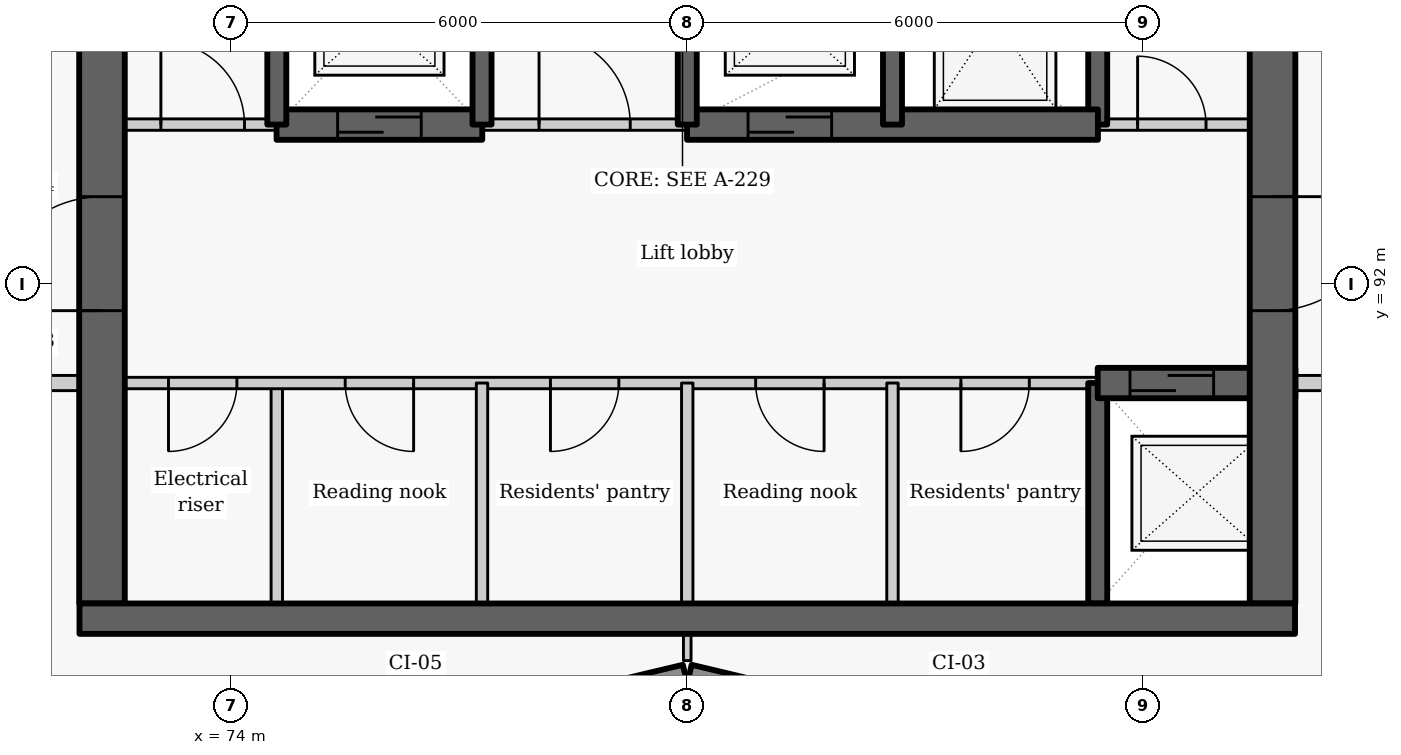
"""IFC4 building model, lengths in metres.
Left out: names, types, materials, properties, quantities, classifications, styles, units other than length and angle.
Written with IfcOpenShell. Run it as: python <this file> out.ifc"""

import sys

from ifc_helpers import new_model, si_unit, direction, frame, frame_2d, origin, place, context, subcontext, project, spatial, rectangle, extrude, element, fill, save


model = new_model("IFC4")
c1 = context("Model", 3, precision=1e-05, world=origin(), true_north=direction((0.0, 1.0)))
c2 = subcontext(c1, "Body", "Model", "MODEL_VIEW")
j1 = project(units=[si_unit("LENGTHUNIT", "METRE"), si_unit("PLANEANGLEUNIT", "RADIAN")], contexts=[c1])
p1 = place(None, origin())
s1 = spatial("IfcSite", under=j1, at=p1, CompositionType="ELEMENT")
p2 = place(p1, origin())
s2 = spatial("IfcBuilding", under=s1, at=p2, CompositionType="ELEMENT")
p3 = place(p2, frame((0.0, 0.0, 166.8)))
s3 = spatial("IfcBuildingStorey", under=s2, at=p3, CompositionType="ELEMENT", Elevation=166.8)
p4 = place(p3, frame((76.814, 86.119, 0.0), z_axis=(0.0, 0.0, 1.0), x_axis=(0.972773113459, 0.231759508395, 0.0)))
e1 = element("IfcWall", 1, at=p4, inside=s3, PredefinedType="SOLIDWALL", context=c2, shape_type="SweptSolid", body=[
    extrude(rectangle(XDim=3.246, YDim=0.25, at=frame_2d((1.623, 0.0))), origin(), (0.0, 0.0, 1.0), 2.05),
])
p5 = place(p4, frame((0.573, 0.0, 0.9)))
e2 = element("IfcOpeningElement", 2, at=p5, cuts=e1, PredefinedType="OPENING", context=c2, shape_type="SweptSolid", body=[
    extrude(rectangle(XDim=2.1, YDim=1.1, at=frame_2d((1.05, 0.55))), frame((0.0, 0.135, 0.0), z_axis=(0.0, -1.0, 0.0), x_axis=(1.0, 0.0, 0.0)), (0.0, 0.0, 1.0), 0.27),
])
p6 = place(p3, frame((80.029, 86.872, 0.0), z_axis=(0.0, 0.0, 1.0), x_axis=(0.972773113459, -0.231759508395, 0.0)))
e3 = element("IfcWall", 3, at=p6, inside=s3, PredefinedType="SOLIDWALL", context=c2, shape_type="SweptSolid", body=[
    extrude(rectangle(XDim=3.246, YDim=0.25, at=frame_2d((1.623, 0.0))), origin(), (0.0, 0.0, 1.0), 2.05),
])
p7 = place(p6, frame((0.573, 0.0, 0.9)))
e4 = element("IfcOpeningElement", 4, at=p7, cuts=e3, PredefinedType="OPENING", context=c2, shape_type="SweptSolid", body=[
    extrude(rectangle(XDim=2.1, YDim=1.1, at=frame_2d((1.05, 0.55))), frame((0.0, 0.135, 0.0), z_axis=(0.0, -1.0, 0.0), x_axis=(1.0, 0.0, 0.0)), (0.0, 0.0, 1.0), 0.27),
])
p8 = place(p3, frame((74.6, 87.8, 0.0), z_axis=(0.0, 0.0, 1.0), x_axis=(0.0, 1.0, 0.0)))
e5 = element("IfcWall", 5, at=p8, inside=s3, PredefinedType="PARTITIONING", context=c2, shape_type="SweptSolid", body=[
    extrude(rectangle(XDim=2.9, YDim=0.15, at=frame_2d((1.45, 0.0))), origin(), (0.0, 0.0, 1.0), 2.95),
])
p9 = place(p3, frame((85.4, 90.7, 0.0), z_axis=(0.0, 0.0, 1.0), x_axis=(-1.0, 0.0, 0.0)))
e6 = element("IfcWall", 6, at=p9, inside=s3, PredefinedType="PARTITIONING", context=c2, shape_type="SweptSolid", body=[
    extrude(rectangle(XDim=13.4, YDim=0.15, at=frame_2d((6.7, 0.0))), origin(), (0.0, 0.0, 1.0), 2.95),
])
p10 = place(p9, frame((11.325, 0.0, 0.0)))
e7 = element("IfcOpeningElement", 7, at=p10, cuts=e6, PredefinedType="OPENING", context=c2, shape_type="SweptSolid", body=[
    extrude(rectangle(XDim=0.9, YDim=2.1, at=frame_2d((0.45, 1.05))), frame((0.0, 0.085, 0.0), z_axis=(0.0, -1.0, 0.0), x_axis=(1.0, 0.0, 0.0)), (0.0, 0.0, 1.0), 0.17),
])
p11 = place(p9, frame((9.0, 0.0, 0.0)))
e8 = element("IfcOpeningElement", 8, at=p11, cuts=e6, PredefinedType="OPENING", context=c2, shape_type="SweptSolid", body=[
    extrude(rectangle(XDim=0.9, YDim=2.1, at=frame_2d((0.45, 1.05))), frame((0.0, 0.085, 0.0), z_axis=(0.0, -1.0, 0.0), x_axis=(1.0, 0.0, 0.0)), (0.0, 0.0, 1.0), 0.17),
])
p12 = place(p9, frame((6.3, 0.0, 0.0)))
e9 = element("IfcOpeningElement", 9, at=p12, cuts=e6, PredefinedType="OPENING", context=c2, shape_type="SweptSolid", body=[
    extrude(rectangle(XDim=0.9, YDim=2.1, at=frame_2d((0.45, 1.05))), frame((0.0, 0.085, 0.0), z_axis=(0.0, -1.0, 0.0), x_axis=(1.0, 0.0, 0.0)), (0.0, 0.0, 1.0), 0.17),
])
p13 = place(p9, frame((3.6, 0.0, 0.0)))
e10 = element("IfcOpeningElement", 10, at=p13, cuts=e6, PredefinedType="OPENING", context=c2, shape_type="SweptSolid", body=[
    extrude(rectangle(XDim=0.9, YDim=2.1, at=frame_2d((0.45, 1.05))), frame((0.0, 0.085, 0.0), z_axis=(0.0, -1.0, 0.0), x_axis=(1.0, 0.0, 0.0)), (0.0, 0.0, 1.0), 0.17),
])
p14 = place(p9, frame((0.9, 0.0, 0.0)))
e11 = element("IfcOpeningElement", 11, at=p14, cuts=e6, PredefinedType="OPENING", context=c2, shape_type="SweptSolid", body=[
    extrude(rectangle(XDim=0.9, YDim=2.1, at=frame_2d((0.45, 1.05))), frame((0.0, 0.085, 0.0), z_axis=(0.0, -1.0, 0.0), x_axis=(1.0, 0.0, 0.0)), (0.0, 0.0, 1.0), 0.17),
])
p15 = place(p3, frame((72.3, 87.8, -0.275), z_axis=(0.0, 0.0, 1.0), x_axis=(0.0, 1.0, 0.0)))
e12 = element("IfcWall", 12, at=p15, inside=s3, PredefinedType="SHEAR", context=c2, shape_type="SweptSolid", body=[
    extrude(rectangle(XDim=9.1, YDim=0.6, at=frame_2d((4.55, 0.0))), origin(), (0.0, 0.0, 1.0), 3.225),
])
p16 = place(p15, frame((3.852, 0.0, 0.275)))
e13 = element("IfcOpeningElement", 13, at=p16, cuts=e12, PredefinedType="OPENING", context=c2, shape_type="SweptSolid", body=[
    extrude(rectangle(XDim=1.5, YDim=2.1, at=frame_2d((0.75, 1.05))), frame((0.0, 0.31, 0.0), z_axis=(0.0, -1.0, 0.0), x_axis=(1.0, 0.0, 0.0)), (0.0, 0.0, 1.0), 0.62),
])
p17 = place(p3, frame((85.4, 87.8, -0.275), z_axis=(0.0, 0.0, 1.0), x_axis=(0.0, 1.0, 0.0)))
e14 = element("IfcWall", 14, at=p17, inside=s3, PredefinedType="SHEAR", context=c2, shape_type="SweptSolid", body=[
    extrude(rectangle(XDim=2.9, YDim=0.25, at=frame_2d((1.45, 0.0))), origin(), (0.0, 0.0, 1.0), 3.225),
])
p18 = place(p3, frame((85.4, 94.1, -0.275), z_axis=(0.0, 0.0, 1.0), x_axis=(0.0, 1.0, 0.0)))
e15 = element("IfcWall", 15, at=p18, inside=s3, PredefinedType="SHEAR", context=c2, shape_type="SweptSolid", body=[
    extrude(rectangle(XDim=2.8, YDim=0.25, at=frame_2d((1.4, 0.0))), origin(), (0.0, 0.0, 1.0), 3.225),
])
p19 = place(p3, frame((85.4, 90.7, -0.275), z_axis=(0.0, 0.0, 1.0), x_axis=(1.0, 0.0, 0.0)))
e16 = element("IfcWall", 16, at=p19, inside=s3, PredefinedType="SHEAR", context=c2, shape_type="SweptSolid", body=[
    extrude(rectangle(XDim=2.6, YDim=0.4, at=frame_2d((1.3, 0.0))), origin(), (0.0, 0.0, 1.0), 3.225),
])
p20 = place(p19, frame((0.425, 0.0, 0.275)))
e17 = element("IfcOpeningElement", 17, at=p20, cuts=e16, PredefinedType="OPENING", context=c2, shape_type="SweptSolid", body=[
    extrude(rectangle(XDim=1.1, YDim=2.1, at=frame_2d((0.55, 1.05))), frame((0.0, 0.21, 0.0), z_axis=(0.0, -1.0, 0.0), x_axis=(1.0, 0.0, 0.0)), (0.0, 0.0, 1.0), 0.42),
])
p21 = place(p3, frame((87.7, 103.4, -0.275), z_axis=(0.0, 0.0, 1.0), x_axis=(0.0, -1.0, 0.0)))
e18 = element("IfcWall", 18, at=p21, inside=s3, PredefinedType="SHEAR", context=c2, shape_type="SweptSolid", body=[
    extrude(rectangle(XDim=15.6, YDim=0.6, at=frame_2d((7.8, 0.0))), origin(), (0.0, 0.0, 1.0), 3.225),
])
p22 = place(p21, frame((10.248, 0.0, 0.275)))
e19 = element("IfcOpeningElement", 19, at=p22, cuts=e18, PredefinedType="OPENING", context=c2, shape_type="SweptSolid", body=[
    extrude(rectangle(XDim=1.5, YDim=2.1, at=frame_2d((0.75, 1.05))), frame((0.0, 0.31, 0.0), z_axis=(0.0, -1.0, 0.0), x_axis=(1.0, 0.0, 0.0)), (0.0, 0.0, 1.0), 0.62),
])
for number, where, z_axis, x_axis in (
    (20, (77.3, 87.8, 0.0), (0.0, 0.0, 1.0), (0.0, 1.0, 0.0)),
    (21, (80.0, 87.8, 0.0), (0.0, 0.0, 1.0), (0.0, 1.0, 0.0)),
    (22, (82.7, 87.8, 0.0), (0.0, 0.0, 1.0), (0.0, 1.0, 0.0)),
):
    element("IfcWall", number, at=place(p3, frame(where, z_axis=z_axis, x_axis=x_axis)), inside=s3, PredefinedType="PARTITIONING", context=c2, shape_type="SweptSolid", body=[
        extrude(rectangle(XDim=2.9, YDim=0.15, at=frame_2d((1.45, 0.0))), origin(), (0.0, 0.0, 1.0), 2.95),
    ])
p23 = place(p3, frame((72.0, 94.1, 0.0), z_axis=(0.0, 0.0, 1.0), x_axis=(1.0, 0.0, 0.0)))
e23 = element("IfcWall", 23, at=p23, inside=s3, PredefinedType="PARTITIONING", context=c2, shape_type="SweptSolid", body=[
    extrude(rectangle(XDim=2.603, YDim=0.15, at=frame_2d((1.302, 0.0))), origin(), (0.0, 0.0, 1.0), 2.95),
])
p24 = place(p23, frame((1.075, 0.0, 0.0)))
e24 = element("IfcOpeningElement", 24, at=p24, cuts=e23, PredefinedType="OPENING", context=c2, shape_type="SweptSolid", body=[
    extrude(rectangle(XDim=1.1, YDim=2.1, at=frame_2d((0.55, 1.05))), frame((0.0, 0.085, 0.0), z_axis=(0.0, -1.0, 0.0), x_axis=(1.0, 0.0, 0.0)), (0.0, 0.0, 1.0), 0.17),
])
p25 = place(p3, frame((77.297, 94.1, 0.0), z_axis=(0.0, 0.0, 1.0), x_axis=(1.0, 0.0, 0.0)))
e25 = element("IfcWall", 25, at=p25, inside=s3, PredefinedType="PARTITIONING", context=c2, shape_type="SweptSolid", body=[
    extrude(rectangle(XDim=2.706, YDim=0.15, at=frame_2d((1.353, 0.0))), origin(), (0.0, 0.0, 1.0), 2.95),
])
p26 = place(p25, frame((0.753, 0.0, 0.0)))
e26 = element("IfcOpeningElement", 26, at=p26, cuts=e25, PredefinedType="OPENING", context=c2, shape_type="SweptSolid", body=[
    extrude(rectangle(XDim=1.2, YDim=2.1, at=frame_2d((0.6, 1.05))), frame((0.0, 0.085, 0.0), z_axis=(0.0, -1.0, 0.0), x_axis=(1.0, 0.0, 0.0)), (0.0, 0.0, 1.0), 0.17),
])
p27 = place(p3, frame((85.397, 94.1, 0.0), z_axis=(0.0, 0.0, 1.0), x_axis=(1.0, 0.0, 0.0)))
e27 = element("IfcWall", 27, at=p27, inside=s3, PredefinedType="PARTITIONING", context=c2, shape_type="SweptSolid", body=[
    extrude(rectangle(XDim=2.603, YDim=0.15, at=frame_2d((1.302, 0.0))), origin(), (0.0, 0.0, 1.0), 2.95),
])
p28 = place(p27, frame((0.528, 0.0, 0.0)))
e28 = element("IfcOpeningElement", 28, at=p28, cuts=e27, PredefinedType="OPENING", context=c2, shape_type="SweptSolid", body=[
    extrude(rectangle(XDim=0.9, YDim=2.1, at=frame_2d((0.45, 1.05))), frame((0.0, 0.085, 0.0), z_axis=(0.0, -1.0, 0.0), x_axis=(1.0, 0.0, 0.0)), (0.0, 0.0, 1.0), 0.17),
])
p29 = place(p3, frame((74.597, 94.1, -0.275), z_axis=(0.0, 0.0, 1.0), x_axis=(1.0, 0.0, 0.0)))
e29 = element("IfcWall", 29, at=p29, inside=s3, PredefinedType="SHEAR", context=c2, shape_type="SweptSolid", body=[
    extrude(rectangle(XDim=2.706, YDim=0.4, at=frame_2d((1.353, 0.0))), origin(), (0.0, 0.0, 1.0), 3.225),
])
p30 = place(p29, frame((0.803, 0.0, 0.275)))
e30 = element("IfcOpeningElement", 30, at=p30, cuts=e29, PredefinedType="OPENING", context=c2, shape_type="SweptSolid", body=[
    extrude(rectangle(XDim=1.1, YDim=2.1, at=frame_2d((0.55, 1.05))), frame((0.0, 0.21, 0.0), z_axis=(0.0, -1.0, 0.0), x_axis=(1.0, 0.0, 0.0)), (0.0, 0.0, 1.0), 0.42),
])
p31 = place(p3, frame((79.997, 94.1, -0.275), z_axis=(0.0, 0.0, 1.0), x_axis=(1.0, 0.0, 0.0)))
e31 = element("IfcWall", 31, at=p31, inside=s3, PredefinedType="SHEAR", context=c2, shape_type="SweptSolid", body=[
    extrude(rectangle(XDim=5.406, YDim=0.4, at=frame_2d((2.703, 0.0))), origin(), (0.0, 0.0, 1.0), 3.225),
])
p32 = place(p31, frame((0.803, 0.0, 0.275)))
e32 = element("IfcOpeningElement", 32, at=p32, cuts=e31, PredefinedType="OPENING", context=c2, shape_type="SweptSolid", body=[
    extrude(rectangle(XDim=1.1, YDim=2.1, at=frame_2d((0.55, 1.05))), frame((0.0, 0.21, 0.0), z_axis=(0.0, -1.0, 0.0), x_axis=(1.0, 0.0, 0.0)), (0.0, 0.0, 1.0), 0.42),
])
for number, where, z_axis, x_axis in (
    (33, (74.6, 94.1, -0.275), (0.0, 0.0, 1.0), (0.0, 1.0, 0.0)),
    (34, (77.3, 94.1, -0.275), (0.0, 0.0, 1.0), (0.0, 1.0, 0.0)),
    (35, (80.0, 94.1, -0.275), (0.0, 0.0, 1.0), (0.0, 1.0, 0.0)),
    (36, (82.7, 94.1, -0.275), (0.0, 0.0, 1.0), (0.0, 1.0, 0.0)),
):
    element("IfcWall", number, at=place(p3, frame(where, z_axis=z_axis, x_axis=x_axis)), inside=s3, PredefinedType="SHEAR", context=c2, shape_type="SweptSolid", body=[
        extrude(rectangle(XDim=2.8, YDim=0.25, at=frame_2d((1.4, 0.0))), origin(), (0.0, 0.0, 1.0), 3.225),
    ])
for number, where, z_axis, x_axis in (
    (37, (70.45, 90.7, 0.0), (0.0, 0.0, 1.0), (1.0, 0.0, 0.0)),
    (38, (88.0, 90.7, 0.0), (0.0, 0.0, 1.0), (1.0, 0.0, 0.0)),
):
    element("IfcWall", number, at=place(p3, frame(where, z_axis=z_axis, x_axis=x_axis)), inside=s3, PredefinedType="PARTITIONING", context=c2, shape_type="SweptSolid", body=[
        extrude(rectangle(XDim=1.55, YDim=0.2, at=frame_2d((0.775, 0.0))), origin(), (0.0, 0.0, 1.0), 2.95),
    ])
p33 = place(p3, frame((80.0, 87.048, 0.0), z_axis=(0.0, 0.0, 1.0), x_axis=(0.0, 1.0, 0.0)))
e39 = element("IfcWall", 39, at=p33, inside=s3, PredefinedType="PARTITIONING", context=c2, shape_type="SweptSolid", body=[
    extrude(rectangle(XDim=0.352, YDim=0.1, at=frame_2d((0.176, 0.0))), origin(), (0.0, 0.0, 1.0), 2.95),
])
p34 = place(p3, frame((72.004, 87.6, -0.275), z_axis=(0.0, 0.0, 1.0), x_axis=(1.0, 0.0, 0.0)))
e40 = element("IfcWall", 40, at=p34, inside=s3, PredefinedType="SHEAR", context=c2, shape_type="SweptSolid", body=[
    extrude(rectangle(XDim=15.992, YDim=0.4, at=frame_2d((7.996, 0.0))), origin(), (0.0, 0.0, 1.0), 3.225),
])
p35 = place(p10, origin())
e41 = element("IfcDoor", 41, at=p35, inside=s3, OperationType="SINGLE_SWING_RIGHT", PredefinedType="DOOR", context=c2, shape_type="SweptSolid", body=[
    extrude(rectangle(XDim=0.9, YDim=2.1, at=frame_2d((0.45, 1.05))), frame((0.0, 0.025, 0.0), z_axis=(0.0, -1.0, 0.0), x_axis=(1.0, 0.0, 0.0)), (0.0, 0.0, 1.0), 0.05),
])
fill(e7, e41)
p36 = place(p20, origin())
e42 = element("IfcDoor", 42, at=p36, inside=s3, OperationType="SLIDING_TO_LEFT", PredefinedType="DOOR", context=c2, shape_type="SweptSolid", body=[
    extrude(rectangle(XDim=1.1, YDim=2.1, at=frame_2d((0.55, 1.05))), frame((0.0, 0.025, 0.0), z_axis=(0.0, -1.0, 0.0), x_axis=(1.0, 0.0, 0.0)), (0.0, 0.0, 1.0), 0.05),
])
fill(e17, e42)
p37 = place(p11, origin())
e43 = element("IfcDoor", 43, at=p37, inside=s3, OperationType="SINGLE_SWING_LEFT", PredefinedType="DOOR", context=c2, shape_type="SweptSolid", body=[
    extrude(rectangle(XDim=0.9, YDim=2.1, at=frame_2d((0.45, 1.05))), frame((0.0, 0.025, 0.0), z_axis=(0.0, -1.0, 0.0), x_axis=(1.0, 0.0, 0.0)), (0.0, 0.0, 1.0), 0.05),
])
fill(e8, e43)
p38 = place(p12, origin())
e44 = element("IfcDoor", 44, at=p38, inside=s3, OperationType="SINGLE_SWING_RIGHT", PredefinedType="DOOR", context=c2, shape_type="SweptSolid", body=[
    extrude(rectangle(XDim=0.9, YDim=2.1, at=frame_2d((0.45, 1.05))), frame((0.0, 0.025, 0.0), z_axis=(0.0, -1.0, 0.0), x_axis=(1.0, 0.0, 0.0)), (0.0, 0.0, 1.0), 0.05),
])
fill(e9, e44)
p39 = place(p13, origin())
e45 = element("IfcDoor", 45, at=p39, inside=s3, OperationType="SINGLE_SWING_LEFT", PredefinedType="DOOR", context=c2, shape_type="SweptSolid", body=[
    extrude(rectangle(XDim=0.9, YDim=2.1, at=frame_2d((0.45, 1.05))), frame((0.0, 0.025, 0.0), z_axis=(0.0, -1.0, 0.0), x_axis=(1.0, 0.0, 0.0)), (0.0, 0.0, 1.0), 0.05),
])
fill(e10, e45)
p40 = place(p14, origin())
e46 = element("IfcDoor", 46, at=p40, inside=s3, OperationType="SINGLE_SWING_RIGHT", PredefinedType="DOOR", context=c2, shape_type="SweptSolid", body=[
    extrude(rectangle(XDim=0.9, YDim=2.1, at=frame_2d((0.45, 1.05))), frame((0.0, 0.025, 0.0), z_axis=(0.0, -1.0, 0.0), x_axis=(1.0, 0.0, 0.0)), (0.0, 0.0, 1.0), 0.05),
])
fill(e11, e46)
p41 = place(p24, origin())
e47 = element("IfcDoor", 47, at=p41, inside=s3, OperationType="SINGLE_SWING_LEFT", PredefinedType="DOOR", context=c2, shape_type="SweptSolid", body=[
    extrude(rectangle(XDim=1.1, YDim=2.1, at=frame_2d((0.55, 1.05))), frame((0.0, 0.025, 0.0), z_axis=(0.0, -1.0, 0.0), x_axis=(1.0, 0.0, 0.0)), (0.0, 0.0, 1.0), 0.05),
])
fill(e24, e47)
p42 = place(p30, origin())
e48 = element("IfcDoor", 48, at=p42, inside=s3, OperationType="SLIDING_TO_LEFT", PredefinedType="DOOR", context=c2, shape_type="SweptSolid", body=[
    extrude(rectangle(XDim=1.1, YDim=2.1, at=frame_2d((0.55, 1.05))), frame((0.0, 0.025, 0.0), z_axis=(0.0, -1.0, 0.0), x_axis=(1.0, 0.0, 0.0)), (0.0, 0.0, 1.0), 0.05),
])
fill(e30, e48)
p43 = place(p26, origin())
e49 = element("IfcDoor", 49, at=p43, inside=s3, OperationType="DOUBLE_DOOR_SINGLE_SWING", PredefinedType="DOOR", context=c2, shape_type="SweptSolid", body=[
    extrude(rectangle(XDim=1.2, YDim=2.1, at=frame_2d((0.6, 1.05))), frame((0.0, 0.025, 0.0), z_axis=(0.0, -1.0, 0.0), x_axis=(1.0, 0.0, 0.0)), (0.0, 0.0, 1.0), 0.05),
])
fill(e26, e49)
p44 = place(p32, origin())
e50 = element("IfcDoor", 50, at=p44, inside=s3, OperationType="SLIDING_TO_LEFT", PredefinedType="DOOR", context=c2, shape_type="SweptSolid", body=[
    extrude(rectangle(XDim=1.1, YDim=2.1, at=frame_2d((0.55, 1.05))), frame((0.0, 0.025, 0.0), z_axis=(0.0, -1.0, 0.0), x_axis=(1.0, 0.0, 0.0)), (0.0, 0.0, 1.0), 0.05),
])
fill(e32, e50)
p45 = place(p28, origin())
e51 = element("IfcDoor", 51, at=p45, inside=s3, OperationType="SINGLE_SWING_LEFT", PredefinedType="DOOR", context=c2, shape_type="SweptSolid", body=[
    extrude(rectangle(XDim=0.9, YDim=2.1, at=frame_2d((0.45, 1.05))), frame((0.0, 0.025, 0.0), z_axis=(0.0, -1.0, 0.0), x_axis=(1.0, 0.0, 0.0)), (0.0, 0.0, 1.0), 0.05),
])
fill(e28, e51)
p46 = place(p22, origin())
e52 = element("IfcDoor", 52, at=p46, inside=s3, OperationType="DOUBLE_DOOR_SINGLE_SWING", PredefinedType="DOOR", context=c2, shape_type="SweptSolid", body=[
    extrude(rectangle(XDim=1.5, YDim=2.1, at=frame_2d((0.75, 1.05))), frame((0.0, 0.025, 0.0), z_axis=(0.0, -1.0, 0.0), x_axis=(1.0, 0.0, 0.0)), (0.0, 0.0, 1.0), 0.05),
])
fill(e19, e52)
p47 = place(p16, origin())
e53 = element("IfcDoor", 53, at=p47, inside=s3, OperationType="DOUBLE_DOOR_SINGLE_SWING", PredefinedType="DOOR", context=c2, shape_type="SweptSolid", body=[
    extrude(rectangle(XDim=1.5, YDim=2.1, at=frame_2d((0.75, 1.05))), frame((0.0, 0.025, 0.0), z_axis=(0.0, -1.0, 0.0), x_axis=(1.0, 0.0, 0.0)), (0.0, 0.0, 1.0), 0.05),
])
fill(e13, e53)
save(model, sys.argv[1])
